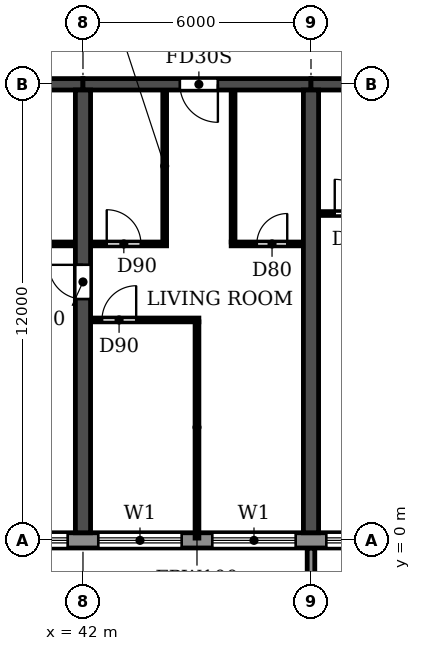
"""IFC4 building model, lengths in metres.
Left out: names, types, materials, properties, quantities, classifications, styles, units other than length and angle.
Written with IfcOpenShell. Run it as: python <this file> out.ifc"""

import sys

from ifc_helpers import new_model, si_unit, direction, frame, frame_2d, origin, place, context, subcontext, project, spatial, polyline, rectangle, outline, extrude, source, transform, mapped, element, fill, save


model = new_model("IFC4")
c1 = context("Model", 3, precision=1e-05, world=origin(), true_north=direction((0.0, 1.0)))
c2 = subcontext(c1, "Body", "Model", "MODEL_VIEW")
j1 = project(units=[si_unit("LENGTHUNIT", "METRE"), si_unit("PLANEANGLEUNIT", "RADIAN")], contexts=[c1])
p1 = place(None, origin())
s1 = spatial("IfcSite", under=j1, at=p1, CompositionType="ELEMENT")
p2 = place(p1, origin())
s2 = spatial("IfcBuilding", under=s1, at=p2, CompositionType="ELEMENT")
p3 = place(p2, frame((0.0, 0.0, 33.3)))
s3 = spatial("IfcBuildingStorey", under=s2, at=p3, CompositionType="ELEMENT", Elevation=33.3)
p4 = place(p3, frame((42.0, 0.2, 0.0), z_axis=(0.0, 0.0, 1.0), x_axis=(0.0, 1.0, 0.0)))
e1 = element("IfcWall", 1, at=p4, inside=s3, PredefinedType="SHEAR", context=c2, shape_type="SweptSolid", body=[
    extrude(rectangle(XDim=11.65, YDim=0.4, at=frame_2d((5.825, 0.0))), origin(), (0.0, 0.0, 1.0), 3.05),
])
p5 = place(p4, frame((6.15, 0.0, 0.0)))
e2 = element("IfcOpeningElement", 2, at=p5, cuts=e1, PredefinedType="OPENING", context=c2, shape_type="SweptSolid", body=[
    extrude(rectangle(XDim=0.9, YDim=2.1, at=frame_2d((0.45, 1.05))), frame((0.0, 0.21, 0.0), z_axis=(0.0, -1.0, 0.0), x_axis=(1.0, 0.0, 0.0)), (0.0, 0.0, 1.0), 0.42),
])
p6 = place(p3, frame((48.0, 0.2, 0.0), z_axis=(0.0, 0.0, 1.0), x_axis=(0.0, 1.0, 0.0)))
e3 = element("IfcWall", 3, at=p6, inside=s3, PredefinedType="SHEAR", context=c2, shape_type="SweptSolid", body=[
    extrude(rectangle(XDim=11.65, YDim=0.4, at=frame_2d((5.825, 0.0))), origin(), (0.0, 0.0, 1.0), 3.05),
])
p7 = place(p3, frame((36.0, 12.0, 0.0), z_axis=(0.0, 0.0, 1.0), x_axis=(1.0, 0.0, 0.0)))
e4 = element("IfcWall", 4, at=p7, inside=s3, PredefinedType="SHEAR", context=c2, shape_type="SweptSolid", body=[
    extrude(rectangle(XDim=6.0, YDim=0.3, at=frame_2d((3.0, 0.0))), origin(), (0.0, 0.0, 1.0), 2.45),
])
p8 = place(p3, frame((42.0, 12.0, 0.0), z_axis=(0.0, 0.0, 1.0), x_axis=(1.0, 0.0, 0.0)))
e5 = element("IfcWall", 5, at=p8, inside=s3, PredefinedType="SHEAR", context=c2, shape_type="SweptSolid", body=[
    extrude(rectangle(XDim=6.0, YDim=0.3, at=frame_2d((3.0, 0.0))), origin(), (0.0, 0.0, 1.0), 2.45),
])
p9 = place(p8, frame((2.55, 0.0, 0.0)))
e6 = element("IfcOpeningElement", 6, at=p9, cuts=e5, PredefinedType="OPENING", context=c2, shape_type="SweptSolid", body=[
    extrude(rectangle(XDim=1.0, YDim=2.1, at=frame_2d((0.5, 1.05))), frame((0.0, 0.16, 0.0), z_axis=(0.0, -1.0, 0.0), x_axis=(1.0, 0.0, 0.0)), (0.0, 0.0, 1.0), 0.32),
])
p10 = place(p3, frame((48.0, 12.0, 0.0), z_axis=(0.0, 0.0, 1.0), x_axis=(1.0, 0.0, 0.0)))
e7 = element("IfcWall", 7, at=p10, inside=s3, PredefinedType="SHEAR", context=c2, shape_type="SweptSolid", body=[
    extrude(rectangle(XDim=6.0, YDim=0.3, at=frame_2d((3.0, 0.0))), origin(), (0.0, 0.0, 1.0), 2.45),
])
p11 = place(p10, frame((2.55, 0.0, 0.0)))
e8 = element("IfcOpeningElement", 8, at=p11, cuts=e7, PredefinedType="OPENING", context=c2, shape_type="SweptSolid", body=[
    extrude(rectangle(XDim=1.0, YDim=2.1, at=frame_2d((0.5, 1.05))), frame((0.0, 0.16, 0.0), z_axis=(0.0, -1.0, 0.0), x_axis=(1.0, 0.0, 0.0)), (0.0, 0.0, 1.0), 0.32),
])
p12 = place(p3, frame((4.683, 0.0, 0.0), z_axis=(0.0, 0.0, 1.0), x_axis=(1.0, 0.0, 0.0)))
e9 = element("IfcWall", 9, at=p12, inside=s3, PredefinedType="STANDARD", context=c2, shape_type="SweptSolid", body=[
    extrude(rectangle(XDim=92.634, YDim=0.4, at=frame_2d((46.317, 0.0))), origin(), (0.0, 0.0, 1.0), 3.05),
])
p13 = place(p12, frame((1.717, 0.0, 0.9)))
e10 = element("IfcOpeningElement", 10, at=p13, cuts=e9, PredefinedType="OPENING", context=c2, shape_type="SweptSolid", body=[
    extrude(rectangle(XDim=2.2, YDim=1.5, at=frame_2d((1.1, 0.75))), frame((0.0, 0.21, 0.0), z_axis=(0.0, -1.0, 0.0), x_axis=(1.0, 0.0, 0.0)), (0.0, 0.0, 1.0), 0.42),
])
p14 = place(p12, frame((4.717, 0.0, 0.9)))
e11 = element("IfcOpeningElement", 11, at=p14, cuts=e9, PredefinedType="OPENING", context=c2, shape_type="SweptSolid", body=[
    extrude(rectangle(XDim=2.2, YDim=1.5, at=frame_2d((1.1, 0.75))), frame((0.0, 0.21, 0.0), z_axis=(0.0, -1.0, 0.0), x_axis=(1.0, 0.0, 0.0)), (0.0, 0.0, 1.0), 0.42),
])
p15 = place(p12, frame((7.917, 0.0, 0.0)))
e12 = element("IfcOpeningElement", 12, at=p15, cuts=e9, PredefinedType="OPENING", context=c2, shape_type="SweptSolid", body=[
    extrude(rectangle(XDim=1.8, YDim=2.4, at=frame_2d((0.9, 1.2))), frame((0.0, 0.21, 0.0), z_axis=(0.0, -1.0, 0.0), x_axis=(1.0, 0.0, 0.0)), (0.0, 0.0, 1.0), 0.42),
])
p16 = place(p12, frame((10.717, 0.0, 0.9)))
e13 = element("IfcOpeningElement", 13, at=p16, cuts=e9, PredefinedType="OPENING", context=c2, shape_type="SweptSolid", body=[
    extrude(rectangle(XDim=2.2, YDim=1.5, at=frame_2d((1.1, 0.75))), frame((0.0, 0.21, 0.0), z_axis=(0.0, -1.0, 0.0), x_axis=(1.0, 0.0, 0.0)), (0.0, 0.0, 1.0), 0.42),
])
p17 = place(p12, frame((13.717, 0.0, 0.9)))
e14 = element("IfcOpeningElement", 14, at=p17, cuts=e9, PredefinedType="OPENING", context=c2, shape_type="SweptSolid", body=[
    extrude(rectangle(XDim=2.2, YDim=1.5, at=frame_2d((1.1, 0.75))), frame((0.0, 0.21, 0.0), z_axis=(0.0, -1.0, 0.0), x_axis=(1.0, 0.0, 0.0)), (0.0, 0.0, 1.0), 0.42),
])
p18 = place(p12, frame((16.717, 0.0, 0.9)))
e15 = element("IfcOpeningElement", 15, at=p18, cuts=e9, PredefinedType="OPENING", context=c2, shape_type="SweptSolid", body=[
    extrude(rectangle(XDim=2.2, YDim=1.5, at=frame_2d((1.1, 0.75))), frame((0.0, 0.21, 0.0), z_axis=(0.0, -1.0, 0.0), x_axis=(1.0, 0.0, 0.0)), (0.0, 0.0, 1.0), 0.42),
])
p19 = place(p12, frame((19.717, 0.0, 0.9)))
e16 = element("IfcOpeningElement", 16, at=p19, cuts=e9, PredefinedType="OPENING", context=c2, shape_type="SweptSolid", body=[
    extrude(rectangle(XDim=2.2, YDim=1.5, at=frame_2d((1.1, 0.75))), frame((0.0, 0.21, 0.0), z_axis=(0.0, -1.0, 0.0), x_axis=(1.0, 0.0, 0.0)), (0.0, 0.0, 1.0), 0.42),
])
p20 = place(p12, frame((22.917, 0.0, 0.0)))
e17 = element("IfcOpeningElement", 17, at=p20, cuts=e9, PredefinedType="OPENING", context=c2, shape_type="SweptSolid", body=[
    extrude(rectangle(XDim=1.8, YDim=2.4, at=frame_2d((0.9, 1.2))), frame((0.0, 0.21, 0.0), z_axis=(0.0, -1.0, 0.0), x_axis=(1.0, 0.0, 0.0)), (0.0, 0.0, 1.0), 0.42),
])
p21 = place(p12, frame((25.717, 0.0, 0.9)))
e18 = element("IfcOpeningElement", 18, at=p21, cuts=e9, PredefinedType="OPENING", context=c2, shape_type="SweptSolid", body=[
    extrude(rectangle(XDim=2.2, YDim=1.5, at=frame_2d((1.1, 0.75))), frame((0.0, 0.21, 0.0), z_axis=(0.0, -1.0, 0.0), x_axis=(1.0, 0.0, 0.0)), (0.0, 0.0, 1.0), 0.42),
])
p22 = place(p12, frame((28.717, 0.0, 0.9)))
e19 = element("IfcOpeningElement", 19, at=p22, cuts=e9, PredefinedType="OPENING", context=c2, shape_type="SweptSolid", body=[
    extrude(rectangle(XDim=2.2, YDim=1.5, at=frame_2d((1.1, 0.75))), frame((0.0, 0.21, 0.0), z_axis=(0.0, -1.0, 0.0), x_axis=(1.0, 0.0, 0.0)), (0.0, 0.0, 1.0), 0.42),
])
p23 = place(p12, frame((31.717, 0.0, 0.9)))
e20 = element("IfcOpeningElement", 20, at=p23, cuts=e9, PredefinedType="OPENING", context=c2, shape_type="SweptSolid", body=[
    extrude(rectangle(XDim=2.2, YDim=1.5, at=frame_2d((1.1, 0.75))), frame((0.0, 0.21, 0.0), z_axis=(0.0, -1.0, 0.0), x_axis=(1.0, 0.0, 0.0)), (0.0, 0.0, 1.0), 0.42),
])
p24 = place(p12, frame((34.717, 0.0, 0.9)))
e21 = element("IfcOpeningElement", 21, at=p24, cuts=e9, PredefinedType="OPENING", context=c2, shape_type="SweptSolid", body=[
    extrude(rectangle(XDim=2.2, YDim=1.5, at=frame_2d((1.1, 0.75))), frame((0.0, 0.21, 0.0), z_axis=(0.0, -1.0, 0.0), x_axis=(1.0, 0.0, 0.0)), (0.0, 0.0, 1.0), 0.42),
])
p25 = place(p12, frame((37.717, 0.0, 0.9)))
e22 = element("IfcOpeningElement", 22, at=p25, cuts=e9, PredefinedType="OPENING", context=c2, shape_type="SweptSolid", body=[
    extrude(rectangle(XDim=2.2, YDim=1.5, at=frame_2d((1.1, 0.75))), frame((0.0, 0.21, 0.0), z_axis=(0.0, -1.0, 0.0), x_axis=(1.0, 0.0, 0.0)), (0.0, 0.0, 1.0), 0.42),
])
p26 = place(p12, frame((40.717, 0.0, 0.9)))
e23 = element("IfcOpeningElement", 23, at=p26, cuts=e9, PredefinedType="OPENING", context=c2, shape_type="SweptSolid", body=[
    extrude(rectangle(XDim=2.2, YDim=1.5, at=frame_2d((1.1, 0.75))), frame((0.0, 0.21, 0.0), z_axis=(0.0, -1.0, 0.0), x_axis=(1.0, 0.0, 0.0)), (0.0, 0.0, 1.0), 0.42),
])
p27 = place(p12, frame((43.717, 0.0, 0.9)))
e24 = element("IfcOpeningElement", 24, at=p27, cuts=e9, PredefinedType="OPENING", context=c2, shape_type="SweptSolid", body=[
    extrude(rectangle(XDim=2.2, YDim=1.5, at=frame_2d((1.1, 0.75))), frame((0.0, 0.21, 0.0), z_axis=(0.0, -1.0, 0.0), x_axis=(1.0, 0.0, 0.0)), (0.0, 0.0, 1.0), 0.42),
])
p28 = place(p12, frame((46.917, 0.0, 0.0)))
e25 = element("IfcOpeningElement", 25, at=p28, cuts=e9, PredefinedType="OPENING", context=c2, shape_type="SweptSolid", body=[
    extrude(rectangle(XDim=1.8, YDim=2.4, at=frame_2d((0.9, 1.2))), frame((0.0, 0.21, 0.0), z_axis=(0.0, -1.0, 0.0), x_axis=(1.0, 0.0, 0.0)), (0.0, 0.0, 1.0), 0.42),
])
p29 = place(p12, frame((49.717, 0.0, 0.9)))
e26 = element("IfcOpeningElement", 26, at=p29, cuts=e9, PredefinedType="OPENING", context=c2, shape_type="SweptSolid", body=[
    extrude(rectangle(XDim=2.2, YDim=1.5, at=frame_2d((1.1, 0.75))), frame((0.0, 0.21, 0.0), z_axis=(0.0, -1.0, 0.0), x_axis=(1.0, 0.0, 0.0)), (0.0, 0.0, 1.0), 0.42),
])
p30 = place(p12, frame((52.717, 0.0, 0.9)))
e27 = element("IfcOpeningElement", 27, at=p30, cuts=e9, PredefinedType="OPENING", context=c2, shape_type="SweptSolid", body=[
    extrude(rectangle(XDim=2.2, YDim=1.5, at=frame_2d((1.1, 0.75))), frame((0.0, 0.21, 0.0), z_axis=(0.0, -1.0, 0.0), x_axis=(1.0, 0.0, 0.0)), (0.0, 0.0, 1.0), 0.42),
])
p31 = place(p12, frame((55.717, 0.0, 0.9)))
e28 = element("IfcOpeningElement", 28, at=p31, cuts=e9, PredefinedType="OPENING", context=c2, shape_type="SweptSolid", body=[
    extrude(rectangle(XDim=2.2, YDim=1.5, at=frame_2d((1.1, 0.75))), frame((0.0, 0.21, 0.0), z_axis=(0.0, -1.0, 0.0), x_axis=(1.0, 0.0, 0.0)), (0.0, 0.0, 1.0), 0.42),
])
p32 = place(p12, frame((58.917, 0.0, 0.0)))
e29 = element("IfcOpeningElement", 29, at=p32, cuts=e9, PredefinedType="OPENING", context=c2, shape_type="SweptSolid", body=[
    extrude(rectangle(XDim=1.8, YDim=2.4, at=frame_2d((0.9, 1.2))), frame((0.0, 0.21, 0.0), z_axis=(0.0, -1.0, 0.0), x_axis=(1.0, 0.0, 0.0)), (0.0, 0.0, 1.0), 0.42),
])
p33 = place(p12, frame((61.717, 0.0, 0.9)))
e30 = element("IfcOpeningElement", 30, at=p33, cuts=e9, PredefinedType="OPENING", context=c2, shape_type="SweptSolid", body=[
    extrude(rectangle(XDim=2.2, YDim=1.5, at=frame_2d((1.1, 0.75))), frame((0.0, 0.21, 0.0), z_axis=(0.0, -1.0, 0.0), x_axis=(1.0, 0.0, 0.0)), (0.0, 0.0, 1.0), 0.42),
])
p34 = place(p12, frame((64.717, 0.0, 0.9)))
e31 = element("IfcOpeningElement", 31, at=p34, cuts=e9, PredefinedType="OPENING", context=c2, shape_type="SweptSolid", body=[
    extrude(rectangle(XDim=2.2, YDim=1.5, at=frame_2d((1.1, 0.75))), frame((0.0, 0.21, 0.0), z_axis=(0.0, -1.0, 0.0), x_axis=(1.0, 0.0, 0.0)), (0.0, 0.0, 1.0), 0.42),
])
p35 = place(p12, frame((67.717, 0.0, 0.9)))
e32 = element("IfcOpeningElement", 32, at=p35, cuts=e9, PredefinedType="OPENING", context=c2, shape_type="SweptSolid", body=[
    extrude(rectangle(XDim=2.2, YDim=1.5, at=frame_2d((1.1, 0.75))), frame((0.0, 0.21, 0.0), z_axis=(0.0, -1.0, 0.0), x_axis=(1.0, 0.0, 0.0)), (0.0, 0.0, 1.0), 0.42),
])
p36 = place(p12, frame((70.917, 0.0, 0.0)))
e33 = element("IfcOpeningElement", 33, at=p36, cuts=e9, PredefinedType="OPENING", context=c2, shape_type="SweptSolid", body=[
    extrude(rectangle(XDim=1.8, YDim=2.4, at=frame_2d((0.9, 1.2))), frame((0.0, 0.21, 0.0), z_axis=(0.0, -1.0, 0.0), x_axis=(1.0, 0.0, 0.0)), (0.0, 0.0, 1.0), 0.42),
])
p37 = place(p12, frame((73.717, 0.0, 0.9)))
e34 = element("IfcOpeningElement", 34, at=p37, cuts=e9, PredefinedType="OPENING", context=c2, shape_type="SweptSolid", body=[
    extrude(rectangle(XDim=2.2, YDim=1.5, at=frame_2d((1.1, 0.75))), frame((0.0, 0.21, 0.0), z_axis=(0.0, -1.0, 0.0), x_axis=(1.0, 0.0, 0.0)), (0.0, 0.0, 1.0), 0.42),
])
p38 = place(p12, frame((76.717, 0.0, 0.9)))
e35 = element("IfcOpeningElement", 35, at=p38, cuts=e9, PredefinedType="OPENING", context=c2, shape_type="SweptSolid", body=[
    extrude(rectangle(XDim=2.2, YDim=1.5, at=frame_2d((1.1, 0.75))), frame((0.0, 0.21, 0.0), z_axis=(0.0, -1.0, 0.0), x_axis=(1.0, 0.0, 0.0)), (0.0, 0.0, 1.0), 0.42),
])
p39 = place(p12, frame((79.717, 0.0, 0.9)))
e36 = element("IfcOpeningElement", 36, at=p39, cuts=e9, PredefinedType="OPENING", context=c2, shape_type="SweptSolid", body=[
    extrude(rectangle(XDim=2.2, YDim=1.5, at=frame_2d((1.1, 0.75))), frame((0.0, 0.21, 0.0), z_axis=(0.0, -1.0, 0.0), x_axis=(1.0, 0.0, 0.0)), (0.0, 0.0, 1.0), 0.42),
])
p40 = place(p12, frame((82.717, 0.0, 0.9)))
e37 = element("IfcOpeningElement", 37, at=p40, cuts=e9, PredefinedType="OPENING", context=c2, shape_type="SweptSolid", body=[
    extrude(rectangle(XDim=2.2, YDim=1.5, at=frame_2d((1.1, 0.75))), frame((0.0, 0.21, 0.0), z_axis=(0.0, -1.0, 0.0), x_axis=(1.0, 0.0, 0.0)), (0.0, 0.0, 1.0), 0.42),
])
p41 = place(p12, frame((85.717, 0.0, 0.9)))
e38 = element("IfcOpeningElement", 38, at=p41, cuts=e9, PredefinedType="OPENING", context=c2, shape_type="SweptSolid", body=[
    extrude(rectangle(XDim=2.2, YDim=1.5, at=frame_2d((1.1, 0.75))), frame((0.0, 0.21, 0.0), z_axis=(0.0, -1.0, 0.0), x_axis=(1.0, 0.0, 0.0)), (0.0, 0.0, 1.0), 0.42),
])
p42 = place(p12, frame((88.717, 0.0, 0.9)))
e39 = element("IfcOpeningElement", 39, at=p42, cuts=e9, PredefinedType="OPENING", context=c2, shape_type="SweptSolid", body=[
    extrude(rectangle(XDim=2.2, YDim=1.5, at=frame_2d((1.1, 0.75))), frame((0.0, 0.21, 0.0), z_axis=(0.0, -1.0, 0.0), x_axis=(1.0, 0.0, 0.0)), (0.0, 0.0, 1.0), 0.42),
])
m1 = source(origin(), c2, "Body", "SweptSolid", [
    extrude(outline(polyline([(0.0, 0.0), (0.2, 0.0), (0.2, 1.65), (0.0, 1.65), (0.0, 0.0)])), origin(), (0.0, 0.0, 1.0), 3.1),
])
p43 = place(p3, frame((47.9, -1.85, 0.0)))
e40 = element("IfcWall", 40, at=p43, inside=s3, PredefinedType="STANDARD", context=c2, shape_type="MappedRepresentation", body=[
    mapped(m1, transform((0.0, 0.0, 0.0))),
])
p44 = place(p3, frame((42.21, 5.8, 0.0), z_axis=(0.0, 0.0, 1.0), x_axis=(1.0, 0.0, 0.0)))
e41 = element("IfcWall", 41, at=p44, inside=s3, PredefinedType="PARTITIONING", context=c2, shape_type="SweptSolid", body=[
    extrude(rectangle(XDim=2.84, YDim=0.1, at=frame_2d((1.42, 0.0))), origin(), (0.0, 0.0, 1.0), 3.05),
])
p45 = place(p44, frame((0.29, 0.0, 0.0)))
e42 = element("IfcOpeningElement", 42, at=p45, cuts=e41, PredefinedType="OPENING", context=c2, shape_type="SweptSolid", body=[
    extrude(rectangle(XDim=0.9, YDim=2.1, at=frame_2d((0.45, 1.05))), frame((0.0, 0.06, 0.0), z_axis=(0.0, -1.0, 0.0), x_axis=(1.0, 0.0, 0.0)), (0.0, 0.0, 1.0), 0.12),
])
p46 = place(p3, frame((39.1, 7.8, 0.0), z_axis=(0.0, 0.0, 1.0), x_axis=(1.0, 0.0, 0.0)))
e43 = element("IfcWall", 43, at=p46, inside=s3, PredefinedType="PARTITIONING", context=c2, shape_type="SweptSolid", body=[
    extrude(rectangle(XDim=2.69, YDim=0.1, at=frame_2d((1.345, 0.0))), origin(), (0.0, 0.0, 1.0), 3.05),
])
p47 = place(p46, frame((1.0, 0.0, 0.0)))
e44 = element("IfcOpeningElement", 44, at=p47, cuts=e43, PredefinedType="OPENING", context=c2, shape_type="SweptSolid", body=[
    extrude(rectangle(XDim=0.8, YDim=2.1, at=frame_2d((0.4, 1.05))), frame((0.0, 0.06, 0.0), z_axis=(0.0, -1.0, 0.0), x_axis=(1.0, 0.0, 0.0)), (0.0, 0.0, 1.0), 0.12),
])
p48 = place(p3, frame((42.21, 7.8, 0.0), z_axis=(0.0, 0.0, 1.0), x_axis=(1.0, 0.0, 0.0)))
e45 = element("IfcWall", 45, at=p48, inside=s3, PredefinedType="PARTITIONING", context=c2, shape_type="SweptSolid", body=[
    extrude(rectangle(XDim=1.99, YDim=0.1, at=frame_2d((0.995, 0.0))), origin(), (0.0, 0.0, 1.0), 3.05),
])
p49 = place(p48, frame((0.415, 0.0, 0.0)))
e46 = element("IfcOpeningElement", 46, at=p49, cuts=e45, PredefinedType="OPENING", context=c2, shape_type="SweptSolid", body=[
    extrude(rectangle(XDim=0.9, YDim=2.1, at=frame_2d((0.45, 1.05))), frame((0.0, 0.06, 0.0), z_axis=(0.0, -1.0, 0.0), x_axis=(1.0, 0.0, 0.0)), (0.0, 0.0, 1.0), 0.12),
])
p50 = place(p3, frame((45.9, 7.8, 0.0), z_axis=(0.0, 0.0, 1.0), x_axis=(1.0, 0.0, 0.0)))
e47 = element("IfcWall", 47, at=p50, inside=s3, PredefinedType="PARTITIONING", context=c2, shape_type="SweptSolid", body=[
    extrude(rectangle(XDim=1.89, YDim=0.1, at=frame_2d((0.945, 0.0))), origin(), (0.0, 0.0, 1.0), 3.05),
])
p51 = place(p50, frame((0.675, 0.0, 0.0)))
e48 = element("IfcOpeningElement", 48, at=p51, cuts=e47, PredefinedType="OPENING", context=c2, shape_type="SweptSolid", body=[
    extrude(rectangle(XDim=0.8, YDim=2.1, at=frame_2d((0.4, 1.05))), frame((0.0, 0.06, 0.0), z_axis=(0.0, -1.0, 0.0), x_axis=(1.0, 0.0, 0.0)), (0.0, 0.0, 1.0), 0.12),
])
p52 = place(p3, frame((48.21, 8.6, 0.0), z_axis=(0.0, 0.0, 1.0), x_axis=(1.0, 0.0, 0.0)))
e49 = element("IfcWall", 49, at=p52, inside=s3, PredefinedType="PARTITIONING", context=c2, shape_type="SweptSolid", body=[
    extrude(rectangle(XDim=1.99, YDim=0.1, at=frame_2d((0.995, 0.0))), origin(), (0.0, 0.0, 1.0), 3.05),
])
p53 = place(p52, frame((0.415, 0.0, 0.0)))
e50 = element("IfcOpeningElement", 50, at=p53, cuts=e49, PredefinedType="OPENING", context=c2, shape_type="SweptSolid", body=[
    extrude(rectangle(XDim=0.9, YDim=2.1, at=frame_2d((0.45, 1.05))), frame((0.0, 0.06, 0.0), z_axis=(0.0, -1.0, 0.0), x_axis=(1.0, 0.0, 0.0)), (0.0, 0.0, 1.0), 0.12),
])
p54 = place(p3, frame((44.15, 7.85, 0.0), z_axis=(0.0, 0.0, 1.0), x_axis=(0.0, 1.0, 0.0)))
e51 = element("IfcWall", 51, at=p54, inside=s3, PredefinedType="PARTITIONING", context=c2, shape_type="SweptSolid", body=[
    extrude(rectangle(XDim=3.99, YDim=0.1, at=frame_2d((1.995, 0.0))), origin(), (0.0, 0.0, 1.0), 3.05),
])
p55 = place(p3, frame((45.0, 0.06, 0.0), z_axis=(0.0, 0.0, 1.0), x_axis=(0.0, 1.0, 0.0)))
e52 = element("IfcWall", 52, at=p55, inside=s3, PredefinedType="PARTITIONING", context=c2, shape_type="SweptSolid", body=[
    extrude(rectangle(XDim=5.69, YDim=0.1, at=frame_2d((2.845, 0.0))), origin(), (0.0, 0.0, 1.0), 3.05),
])
p56 = place(p3, frame((45.95, 7.85, 0.0), z_axis=(0.0, 0.0, 1.0), x_axis=(0.0, 1.0, 0.0)))
e53 = element("IfcWall", 53, at=p56, inside=s3, PredefinedType="PARTITIONING", context=c2, shape_type="SweptSolid", body=[
    extrude(rectangle(XDim=3.99, YDim=0.1, at=frame_2d((1.995, 0.0))), origin(), (0.0, 0.0, 1.0), 3.05),
])
p57 = place(p24, origin())
e54 = element("IfcWindow", 54, at=p57, inside=s3, PartitioningType="DOUBLE_PANEL_HORIZONTAL", PredefinedType="WINDOW", context=c2, shape_type="SweptSolid", body=[
    extrude(rectangle(XDim=2.2, YDim=1.5, at=frame_2d((1.1, 0.75))), frame((0.0, 0.03, 0.0), z_axis=(0.0, -1.0, 0.0), x_axis=(1.0, 0.0, 0.0)), (0.0, 0.0, 1.0), 0.06),
])
fill(e21, e54)
p58 = place(p25, origin())
e55 = element("IfcWindow", 55, at=p58, inside=s3, PartitioningType="DOUBLE_PANEL_HORIZONTAL", PredefinedType="WINDOW", context=c2, shape_type="SweptSolid", body=[
    extrude(rectangle(XDim=2.2, YDim=1.5, at=frame_2d((1.1, 0.75))), frame((0.0, 0.03, 0.0), z_axis=(0.0, -1.0, 0.0), x_axis=(1.0, 0.0, 0.0)), (0.0, 0.0, 1.0), 0.06),
])
fill(e22, e55)
p59 = place(p26, origin())
e56 = element("IfcWindow", 56, at=p59, inside=s3, PartitioningType="DOUBLE_PANEL_HORIZONTAL", PredefinedType="WINDOW", context=c2, shape_type="SweptSolid", body=[
    extrude(rectangle(XDim=2.2, YDim=1.5, at=frame_2d((1.1, 0.75))), frame((0.0, 0.03, 0.0), z_axis=(0.0, -1.0, 0.0), x_axis=(1.0, 0.0, 0.0)), (0.0, 0.0, 1.0), 0.06),
])
fill(e23, e56)
p60 = place(p27, origin())
e57 = element("IfcWindow", 57, at=p60, inside=s3, PartitioningType="DOUBLE_PANEL_HORIZONTAL", PredefinedType="WINDOW", context=c2, shape_type="SweptSolid", body=[
    extrude(rectangle(XDim=2.2, YDim=1.5, at=frame_2d((1.1, 0.75))), frame((0.0, 0.03, 0.0), z_axis=(0.0, -1.0, 0.0), x_axis=(1.0, 0.0, 0.0)), (0.0, 0.0, 1.0), 0.06),
])
fill(e24, e57)
p61 = place(p5, origin())
e58 = element("IfcDoor", 58, at=p61, inside=s3, OperationType="SINGLE_SWING_RIGHT", PredefinedType="DOOR", context=c2, shape_type="SweptSolid", body=[
    extrude(rectangle(XDim=0.9, YDim=2.1, at=frame_2d((0.45, 1.05))), frame((0.0, 0.025, 0.0), z_axis=(0.0, -1.0, 0.0), x_axis=(1.0, 0.0, 0.0)), (0.0, 0.0, 1.0), 0.05),
])
fill(e2, e58)
p62 = place(p45, origin())
e59 = element("IfcDoor", 59, at=p62, inside=s3, OperationType="SINGLE_SWING_RIGHT", PredefinedType="DOOR", context=c2, shape_type="SweptSolid", body=[
    extrude(rectangle(XDim=0.9, YDim=2.1, at=frame_2d((0.45, 1.05))), frame((0.0, 0.025, 0.0), z_axis=(0.0, -1.0, 0.0), x_axis=(1.0, 0.0, 0.0)), (0.0, 0.0, 1.0), 0.05),
])
fill(e42, e59)
p63 = place(p49, origin())
e60 = element("IfcDoor", 60, at=p63, inside=s3, OperationType="SINGLE_SWING_LEFT", PredefinedType="DOOR", context=c2, shape_type="SweptSolid", body=[
    extrude(rectangle(XDim=0.9, YDim=2.1, at=frame_2d((0.45, 1.05))), frame((0.0, 0.025, 0.0), z_axis=(0.0, -1.0, 0.0), x_axis=(1.0, 0.0, 0.0)), (0.0, 0.0, 1.0), 0.05),
])
fill(e46, e60)
p64 = place(p9, frame((1.0, 0.0, 0.0), z_axis=(0.0, 0.0, 1.0), x_axis=(-1.0, 0.0, 0.0)))
e61 = element("IfcDoor", 61, at=p64, inside=s3, OperationType="SINGLE_SWING_LEFT", PredefinedType="DOOR", context=c2, shape_type="SweptSolid", body=[
    extrude(rectangle(XDim=1.0, YDim=2.1, at=frame_2d((0.5, 1.05))), frame((0.0, 0.025, 0.0), z_axis=(0.0, -1.0, 0.0), x_axis=(1.0, 0.0, 0.0)), (0.0, 0.0, 1.0), 0.05),
])
fill(e6, e61)
p65 = place(p51, origin())
e62 = element("IfcDoor", 62, at=p65, inside=s3, OperationType="SINGLE_SWING_RIGHT", PredefinedType="DOOR", context=c2, shape_type="SweptSolid", body=[
    extrude(rectangle(XDim=0.8, YDim=2.1, at=frame_2d((0.4, 1.05))), frame((0.0, 0.025, 0.0), z_axis=(0.0, -1.0, 0.0), x_axis=(1.0, 0.0, 0.0)), (0.0, 0.0, 1.0), 0.05),
])
fill(e48, e62)
p66 = place(p53, origin())
e63 = element("IfcDoor", 63, at=p66, inside=s3, OperationType="SINGLE_SWING_LEFT", PredefinedType="DOOR", context=c2, shape_type="SweptSolid", body=[
    extrude(rectangle(XDim=0.9, YDim=2.1, at=frame_2d((0.45, 1.05))), frame((0.0, 0.025, 0.0), z_axis=(0.0, -1.0, 0.0), x_axis=(1.0, 0.0, 0.0)), (0.0, 0.0, 1.0), 0.05),
])
fill(e50, e63)
save(model, sys.argv[1])
